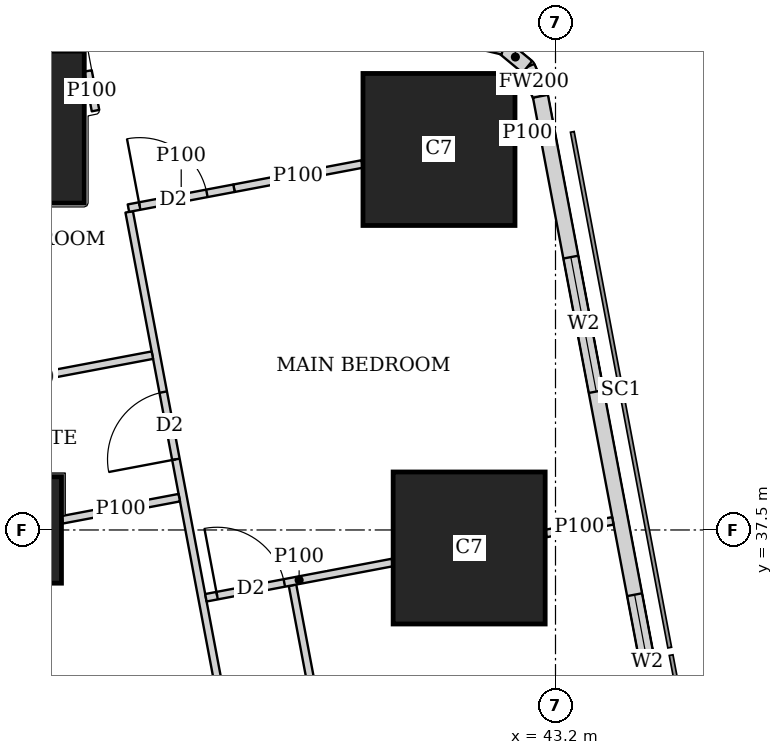
"""IFC4 building model, lengths in metres.
Left out: names, types, materials, properties, quantities, classifications, styles, units other than length and angle.
Written with IfcOpenShell. Run it as: python <this file> out.ifc"""

import sys

from ifc_helpers import new_model, si_unit, direction, frame, frame_2d, origin, origin_2d, place, context, subcontext, project, spatial, rectangle, extrude, element, fill, save


model = new_model("IFC4")
c1 = context("Model", 3, precision=1e-05, world=origin(), true_north=direction((0.0, 1.0)))
c2 = subcontext(c1, "Body", "Model", "MODEL_VIEW")
j1 = project(units=[si_unit("LENGTHUNIT", "METRE"), si_unit("PLANEANGLEUNIT", "RADIAN")], contexts=[c1])
p1 = place(None, origin())
s1 = spatial("IfcSite", under=j1, at=p1, CompositionType="ELEMENT")
p2 = place(p1, origin())
s2 = spatial("IfcBuilding", under=s1, at=p2, CompositionType="ELEMENT")
p3 = place(p2, frame((0.0, 0.0, 289.1)))
s3 = spatial("IfcBuildingStorey", under=s2, at=p3, CompositionType="ELEMENT", Elevation=289.1)
p4 = place(p3, frame((36.0, 37.5, 0.0), z_axis=(0.0, 0.0, 1.0), x_axis=(1.0, 0.0, 0.0)))
e1 = element("IfcColumn", 1, at=p4, inside=s3, PredefinedType="COLUMN", context=c2, shape_type="SweptSolid", body=[
    extrude(rectangle(XDim=1.4, YDim=1.4, at=origin_2d()), origin(), (0.0, 0.0, 1.0), 3.75),
])
for number, where, z_axis, x_axis in (
    (2, (42.064, 37.263, 0.0), (0.0, 0.0, 1.0), (1.0, 0.0, 0.0)),
    (3, (36.0, 42.8, 0.0), (0.0, 0.0, 1.0), (1.0, 0.0, 0.0)),
    (4, (41.667, 42.506, 0.0), (0.0, 0.0, 1.0), (1.0, 0.0, 0.0)),
):
    element("IfcColumn", number, at=place(p3, frame(where, z_axis=z_axis, x_axis=x_axis)), inside=s3, PredefinedType="COLUMN", context=c2, shape_type="SweptSolid", body=[
        extrude(rectangle(XDim=2.0, YDim=2.0, at=origin_2d()), origin(), (0.0, 0.0, 1.0), 3.75),
    ])
p5 = place(p3, frame((49.684, 7.832, 0.0), z_axis=(0.0, 0.0, 1.0), x_axis=(-0.185616669694, 0.982622232565, 0.0)))
e5 = element("IfcWall", 5, at=p5, inside=s3, PredefinedType="SOLIDWALL", context=c2, shape_type="SweptSolid", body=[
    extrude(rectangle(XDim=36.0, YDim=0.2, at=frame_2d((18.0, 0.0))), origin(), (0.0, 0.0, 1.0), 3.5),
])
p6 = place(p5, frame((2.518, 0.0, 0.9)))
e6 = element("IfcOpeningElement", 6, at=p6, cuts=e5, PredefinedType="OPENING", context=c2, shape_type="SweptSolid", body=[
    extrude(rectangle(XDim=2.4, YDim=1.5, at=frame_2d((1.2, 0.75))), frame((0.0, 0.11, 0.0), z_axis=(0.0, -1.0, 0.0), x_axis=(1.0, 0.0, 0.0)), (0.0, 0.0, 1.0), 0.22),
])
p7 = place(p5, frame((8.444, 0.0, 0.9)))
e7 = element("IfcOpeningElement", 7, at=p7, cuts=e5, PredefinedType="OPENING", context=c2, shape_type="SweptSolid", body=[
    extrude(rectangle(XDim=1.8, YDim=1.5, at=frame_2d((0.9, 0.75))), frame((0.0, 0.11, 0.0), z_axis=(0.0, -1.0, 0.0), x_axis=(1.0, 0.0, 0.0)), (0.0, 0.0, 1.0), 0.22),
])
p8 = place(p5, frame((12.261, 0.0, 0.9)))
e8 = element("IfcOpeningElement", 8, at=p8, cuts=e5, PredefinedType="OPENING", context=c2, shape_type="SweptSolid", body=[
    extrude(rectangle(XDim=1.8, YDim=1.5, at=frame_2d((0.9, 0.75))), frame((0.0, 0.11, 0.0), z_axis=(0.0, -1.0, 0.0), x_axis=(1.0, 0.0, 0.0)), (0.0, 0.0, 1.0), 0.22),
])
p9 = place(p5, frame((16.078, 0.0, 0.9)))
e9 = element("IfcOpeningElement", 9, at=p9, cuts=e5, PredefinedType="OPENING", context=c2, shape_type="SweptSolid", body=[
    extrude(rectangle(XDim=1.8, YDim=1.5, at=frame_2d((0.9, 0.75))), frame((0.0, 0.11, 0.0), z_axis=(0.0, -1.0, 0.0), x_axis=(1.0, 0.0, 0.0)), (0.0, 0.0, 1.0), 0.22),
])
p10 = place(p5, frame((19.894, 0.0, 0.9)))
e10 = element("IfcOpeningElement", 10, at=p10, cuts=e5, PredefinedType="OPENING", context=c2, shape_type="SweptSolid", body=[
    extrude(rectangle(XDim=1.8, YDim=1.5, at=frame_2d((0.9, 0.75))), frame((0.0, 0.11, 0.0), z_axis=(0.0, -1.0, 0.0), x_axis=(1.0, 0.0, 0.0)), (0.0, 0.0, 1.0), 0.22),
])
p11 = place(p5, frame((23.71, 0.0, 0.9)))
e11 = element("IfcOpeningElement", 11, at=p11, cuts=e5, PredefinedType="OPENING", context=c2, shape_type="SweptSolid", body=[
    extrude(rectangle(XDim=1.8, YDim=1.5, at=frame_2d((0.9, 0.75))), frame((0.0, 0.11, 0.0), z_axis=(0.0, -1.0, 0.0), x_axis=(1.0, 0.0, 0.0)), (0.0, 0.0, 1.0), 0.22),
])
p12 = place(p5, frame((27.526, 0.0, 0.9)))
e12 = element("IfcOpeningElement", 12, at=p12, cuts=e5, PredefinedType="OPENING", context=c2, shape_type="SweptSolid", body=[
    extrude(rectangle(XDim=1.8, YDim=1.5, at=frame_2d((0.9, 0.75))), frame((0.0, 0.11, 0.0), z_axis=(0.0, -1.0, 0.0), x_axis=(1.0, 0.0, 0.0)), (0.0, 0.0, 1.0), 0.22),
])
p13 = place(p5, frame((32.046, 0.0, 0.9)))
e13 = element("IfcOpeningElement", 13, at=p13, cuts=e5, PredefinedType="OPENING", context=c2, shape_type="SweptSolid", body=[
    extrude(rectangle(XDim=1.8, YDim=1.5, at=frame_2d((0.9, 0.75))), frame((0.0, 0.11, 0.0), z_axis=(0.0, -1.0, 0.0), x_axis=(1.0, 0.0, 0.0)), (0.0, 0.0, 1.0), 0.22),
])
p14 = place(p3, frame((43.002, 43.206, 0.0), z_axis=(0.0, 0.0, 1.0), x_axis=(-0.40678170573, 0.913525393124, 0.0)))
e14 = element("IfcWall", 14, at=p14, inside=s3, PredefinedType="SOLIDWALL", context=c2, shape_type="SweptSolid", body=[
    extrude(rectangle(XDim=0.423, YDim=0.2, at=frame_2d((0.211, 0.0))), origin(), (0.0, 0.0, 1.0), 3.5),
])
p15 = place(p3, frame((42.83, 43.592, 0.0), z_axis=(0.0, 0.0, 1.0), x_axis=(-0.771190539797, 0.636604391539, 0.0)))
e15 = element("IfcWall", 15, at=p15, inside=s3, PredefinedType="SOLIDWALL", context=c2, shape_type="SweptSolid", body=[
    extrude(rectangle(XDim=0.41, YDim=0.2, at=frame_2d((0.205, 0.0))), origin(), (0.0, 0.0, 1.0), 3.5),
])
p16 = place(p3, frame((42.514, 43.853, 0.0), z_axis=(0.0, 0.0, 1.0), x_axis=(-0.973288080424, 0.229587265555, 0.0)))
e16 = element("IfcWall", 16, at=p16, inside=s3, PredefinedType="SOLIDWALL", context=c2, shape_type="SweptSolid", body=[
    extrude(rectangle(XDim=0.422, YDim=0.2, at=frame_2d((0.211, 0.0))), origin(), (0.0, 0.0, 1.0), 3.5),
])
p17 = place(p3, frame((34.036, 42.186, 0.0), z_axis=(0.0, 0.0, 1.0), x_axis=(0.185593518645, -0.9826266055, 0.0)))
e17 = element("IfcWall", 17, at=p17, inside=s3, PredefinedType="SOLIDWALL", context=c2, shape_type="SweptSolid", body=[
    extrude(rectangle(XDim=35.961, YDim=0.15, at=frame_2d((17.98, 0.0))), origin(), (0.0, 0.0, 1.0), 2.5),
])
p18 = place(p17, frame((19.345, 0.0, 0.0)))
e18 = element("IfcOpeningElement", 18, at=p18, cuts=e17, PredefinedType="OPENING", context=c2, shape_type="SweptSolid", body=[
    extrude(rectangle(XDim=1.0, YDim=2.1, at=frame_2d((0.5, 1.05))), frame((0.0, 0.085, 0.0), z_axis=(0.0, -1.0, 0.0), x_axis=(1.0, 0.0, 0.0)), (0.0, 0.0, 1.0), 0.17),
])
p19 = place(p17, frame((33.774, 0.0, 0.0)))
e19 = element("IfcOpeningElement", 19, at=p19, cuts=e17, PredefinedType="OPENING", context=c2, shape_type="SweptSolid", body=[
    extrude(rectangle(XDim=1.0, YDim=2.1, at=frame_2d((0.5, 1.05))), frame((0.0, 0.085, 0.0), z_axis=(0.0, -1.0, 0.0), x_axis=(1.0, 0.0, 0.0)), (0.0, 0.0, 1.0), 0.17),
])
p20 = place(p3, frame((37.049, 43.539, 0.0), z_axis=(0.0, 0.0, 1.0), x_axis=(0.186119495745, -0.982527115811, 0.0)))
e20 = element("IfcWall", 20, at=p20, inside=s3, PredefinedType="PARTITIONING", context=c2, shape_type="SweptSolid", body=[
    extrude(rectangle(XDim=0.531, YDim=0.1, at=frame_2d((0.266, 0.0))), origin(), (0.0, 0.0, 1.0), 2.05),
])
p21 = place(p3, frame((42.985, 42.755, 0.0), z_axis=(0.0, 0.0, 1.0), x_axis=(-0.98281924824, -0.184570651215, 0.0)))
e21 = element("IfcWall", 21, at=p21, inside=s3, PredefinedType="PARTITIONING", context=c2, shape_type="SweptSolid", body=[
    extrude(rectangle(XDim=0.313, YDim=0.1, at=frame_2d((0.157, 0.0))), origin(), (0.0, 0.0, 1.0), 3.5),
])
p22 = place(p3, frame((40.657, 42.315, 0.0), z_axis=(0.0, 0.0, 1.0), x_axis=(-0.982603924403, -0.185713563715, 0.0)))
e22 = element("IfcWall", 22, at=p22, inside=s3, PredefinedType="PARTITIONING", context=c2, shape_type="SweptSolid", body=[
    extrude(rectangle(XDim=1.717, YDim=0.1, at=frame_2d((0.858, 0.0))), origin(), (0.0, 0.0, 1.0), 2.05),
])
p23 = place(p3, frame((38.97, 41.996, 0.0), z_axis=(0.0, 0.0, 1.0), x_axis=(-0.982642648049, -0.185508561084, 0.0)))
e23 = element("IfcWall", 23, at=p23, inside=s3, PredefinedType="PARTITIONING", context=c2, shape_type="SweptSolid", body=[
    extrude(rectangle(XDim=1.413, YDim=0.1, at=frame_2d((0.707, 0.0))), origin(), (0.0, 0.0, 1.0), 3.5),
])
p24 = place(p23, frame((0.363, 0.0, 0.0)))
e24 = element("IfcOpeningElement", 24, at=p24, cuts=e23, PredefinedType="OPENING", context=c2, shape_type="SweptSolid", body=[
    extrude(rectangle(XDim=0.9, YDim=2.1, at=frame_2d((0.45, 1.05))), frame((0.0, 0.06, 0.0), z_axis=(0.0, -1.0, 0.0), x_axis=(1.0, 0.0, 0.0)), (0.0, 0.0, 1.0), 0.12),
])
p25 = place(p3, frame((43.955, 37.62, 0.0), z_axis=(0.0, 0.0, 1.0), x_axis=(-0.982708424405, -0.18515980288, 0.0)))
e25 = element("IfcWall", 25, at=p25, inside=s3, PredefinedType="PARTITIONING", context=c2, shape_type="SweptSolid", body=[
    extrude(rectangle(XDim=0.897, YDim=0.1, at=frame_2d((0.448, 0.0))), origin(), (0.0, 0.0, 1.0), 3.5),
])
p26 = place(p3, frame((41.054, 37.072, 0.0), z_axis=(0.0, 0.0, 1.0), x_axis=(-0.982579896219, -0.185840650951, 0.0)))
e26 = element("IfcWall", 26, at=p26, inside=s3, PredefinedType="PARTITIONING", context=c2, shape_type="SweptSolid", body=[
    extrude(rectangle(XDim=2.497, YDim=0.1, at=frame_2d((1.249, 0.0))), origin(), (0.0, 0.0, 1.0), 3.5),
])
p27 = place(p26, frame((1.447, 0.0, 0.0)))
e27 = element("IfcOpeningElement", 27, at=p27, cuts=e26, PredefinedType="OPENING", context=c2, shape_type="SweptSolid", body=[
    extrude(rectangle(XDim=0.9, YDim=2.1, at=frame_2d((0.45, 1.05))), frame((0.0, 0.06, 0.0), z_axis=(0.0, -1.0, 0.0), x_axis=(1.0, 0.0, 0.0)), (0.0, 0.0, 1.0), 0.12),
])
p28 = place(p3, frame((37.896, 39.8, 0.0), z_axis=(0.0, 0.0, 1.0), x_axis=(-0.982607026909, -0.185697147715, 0.0)))
e28 = element("IfcWall", 28, at=p28, inside=s3, PredefinedType="PARTITIONING", context=c2, shape_type="SweptSolid", body=[
    extrude(rectangle(XDim=3.275, YDim=0.1, at=frame_2d((1.637, 0.0))), origin(), (0.0, 0.0, 1.0), 3.5),
])
p29 = place(p3, frame((38.25, 37.925, 0.0), z_axis=(0.0, 0.0, 1.0), x_axis=(-0.982610209589, -0.185680305934, 0.0)))
e29 = element("IfcWall", 29, at=p29, inside=s3, PredefinedType="PARTITIONING", context=c2, shape_type="SweptSolid", body=[
    extrude(rectangle(XDim=1.567, YDim=0.1, at=frame_2d((0.784, 0.0))), origin(), (0.0, 0.0, 1.0), 3.5),
])
p30 = place(p3, frame((37.591, 41.685, 0.0), z_axis=(0.0, 0.0, 1.0), x_axis=(0.185541820726, -0.982636368532, 0.0)))
e30 = element("IfcWall", 30, at=p30, inside=s3, PredefinedType="PARTITIONING", context=c2, shape_type="SweptSolid", body=[
    extrude(rectangle(XDim=16.735, YDim=0.1, at=frame_2d((8.367, 0.0))), origin(), (0.0, 0.0, 1.0), 2.5),
])
p31 = place(p30, frame((2.413, 0.0, 0.0)))
e31 = element("IfcOpeningElement", 31, at=p31, cuts=e30, PredefinedType="OPENING", context=c2, shape_type="SweptSolid", body=[
    extrude(rectangle(XDim=0.9, YDim=2.1, at=frame_2d((0.45, 1.05))), frame((0.0, 0.06, 0.0), z_axis=(0.0, -1.0, 0.0), x_axis=(1.0, 0.0, 0.0)), (0.0, 0.0, 1.0), 0.12),
])
p32 = place(p30, frame((6.713, 0.0, 0.0)))
e32 = element("IfcOpeningElement", 32, at=p32, cuts=e30, PredefinedType="OPENING", context=c2, shape_type="SweptSolid", body=[
    extrude(rectangle(XDim=0.9, YDim=2.1, at=frame_2d((0.45, 1.05))), frame((0.0, 0.06, 0.0), z_axis=(0.0, -1.0, 0.0), x_axis=(1.0, 0.0, 0.0)), (0.0, 0.0, 1.0), 0.12),
])
p33 = place(p30, frame((9.805, 0.0, 0.0)))
e33 = element("IfcOpeningElement", 33, at=p33, cuts=e30, PredefinedType="OPENING", context=c2, shape_type="SweptSolid", body=[
    extrude(rectangle(XDim=0.9, YDim=2.1, at=frame_2d((0.45, 1.05))), frame((0.0, 0.06, 0.0), z_axis=(0.0, -1.0, 0.0), x_axis=(1.0, 0.0, 0.0)), (0.0, 0.0, 1.0), 0.12),
])
p34 = place(p30, frame((11.713, 0.0, 0.0)))
e34 = element("IfcOpeningElement", 34, at=p34, cuts=e30, PredefinedType="OPENING", context=c2, shape_type="SweptSolid", body=[
    extrude(rectangle(XDim=0.9, YDim=2.1, at=frame_2d((0.45, 1.05))), frame((0.0, 0.06, 0.0), z_axis=(0.0, -1.0, 0.0), x_axis=(1.0, 0.0, 0.0)), (0.0, 0.0, 1.0), 0.12),
])
p35 = place(p30, frame((14.426, 0.0, 0.0)))
e35 = element("IfcOpeningElement", 35, at=p35, cuts=e30, PredefinedType="OPENING", context=c2, shape_type="SweptSolid", body=[
    extrude(rectangle(XDim=0.9, YDim=2.1, at=frame_2d((0.45, 1.05))), frame((0.0, 0.06, 0.0), z_axis=(0.0, -1.0, 0.0), x_axis=(1.0, 0.0, 0.0)), (0.0, 0.0, 1.0), 0.12),
])
p36 = place(p3, frame((39.74, 36.773, 0.0), z_axis=(0.0, 0.0, 1.0), x_axis=(0.185583825641, -0.982628436216, 0.0)))
e36 = element("IfcWall", 36, at=p36, inside=s3, PredefinedType="PARTITIONING", context=c2, shape_type="SweptSolid", body=[
    extrude(rectangle(XDim=7.533, YDim=0.1, at=frame_2d((3.766, 0.0))), origin(), (0.0, 0.0, 1.0), 2.5),
])
p37 = place(p36, frame((2.726, 0.0, 0.0)))
e37 = element("IfcOpeningElement", 37, at=p37, cuts=e36, PredefinedType="OPENING", context=c2, shape_type="SweptSolid", body=[
    extrude(rectangle(XDim=0.9, YDim=2.1, at=frame_2d((0.45, 1.05))), frame((0.0, 0.06, 0.0), z_axis=(0.0, -1.0, 0.0), x_axis=(1.0, 0.0, 0.0)), (0.0, 0.0, 1.0), 0.12),
])
p38 = place(p36, frame((6.383, 0.0, 0.0)))
e38 = element("IfcOpeningElement", 38, at=p38, cuts=e36, PredefinedType="OPENING", context=c2, shape_type="SweptSolid", body=[
    extrude(rectangle(XDim=0.9, YDim=2.1, at=frame_2d((0.45, 1.05))), frame((0.0, 0.06, 0.0), z_axis=(0.0, -1.0, 0.0), x_axis=(1.0, 0.0, 0.0)), (0.0, 0.0, 1.0), 0.12),
])
p39 = place(p12, origin())
e39 = element("IfcWindow", 39, at=p39, inside=s3, PartitioningType="SINGLE_PANEL", PredefinedType="WINDOW", context=c2, shape_type="SweptSolid", body=[
    extrude(rectangle(XDim=1.8, YDim=1.5, at=frame_2d((0.9, 0.75))), frame((0.0, 0.03, 0.0), z_axis=(0.0, -1.0, 0.0), x_axis=(1.0, 0.0, 0.0)), (0.0, 0.0, 1.0), 0.06),
])
fill(e12, e39)
p40 = place(p13, origin())
e40 = element("IfcWindow", 40, at=p40, inside=s3, PartitioningType="SINGLE_PANEL", PredefinedType="WINDOW", context=c2, shape_type="SweptSolid", body=[
    extrude(rectangle(XDim=1.8, YDim=1.5, at=frame_2d((0.9, 0.75))), frame((0.0, 0.03, 0.0), z_axis=(0.0, -1.0, 0.0), x_axis=(1.0, 0.0, 0.0)), (0.0, 0.0, 1.0), 0.06),
])
fill(e13, e40)
p41 = place(p27, origin())
e41 = element("IfcDoor", 41, at=p41, inside=s3, OperationType="SINGLE_SWING_LEFT", PredefinedType="DOOR", context=c2, shape_type="SweptSolid", body=[
    extrude(rectangle(XDim=0.9, YDim=2.1, at=frame_2d((0.45, 1.05))), frame((0.0, 0.025, 0.0), z_axis=(0.0, -1.0, 0.0), x_axis=(1.0, 0.0, 0.0)), (0.0, 0.0, 1.0), 0.05),
])
fill(e27, e41)
p42 = place(p24, origin())
e42 = element("IfcDoor", 42, at=p42, inside=s3, OperationType="SINGLE_SWING_LEFT", PredefinedType="DOOR", context=c2, shape_type="SweptSolid", body=[
    extrude(rectangle(XDim=0.9, YDim=2.1, at=frame_2d((0.45, 1.05))), frame((0.0, 0.025, 0.0), z_axis=(0.0, -1.0, 0.0), x_axis=(1.0, 0.0, 0.0)), (0.0, 0.0, 1.0), 0.05),
])
fill(e24, e42)
p43 = place(p31, origin())
e43 = element("IfcDoor", 43, at=p43, inside=s3, OperationType="SINGLE_SWING_LEFT", PredefinedType="DOOR", context=c2, shape_type="SweptSolid", body=[
    extrude(rectangle(XDim=0.9, YDim=2.1, at=frame_2d((0.45, 1.05))), frame((0.0, 0.025, 0.0), z_axis=(0.0, -1.0, 0.0), x_axis=(1.0, 0.0, 0.0)), (0.0, 0.0, 1.0), 0.05),
])
fill(e31, e43)
save(model, sys.argv[1])
